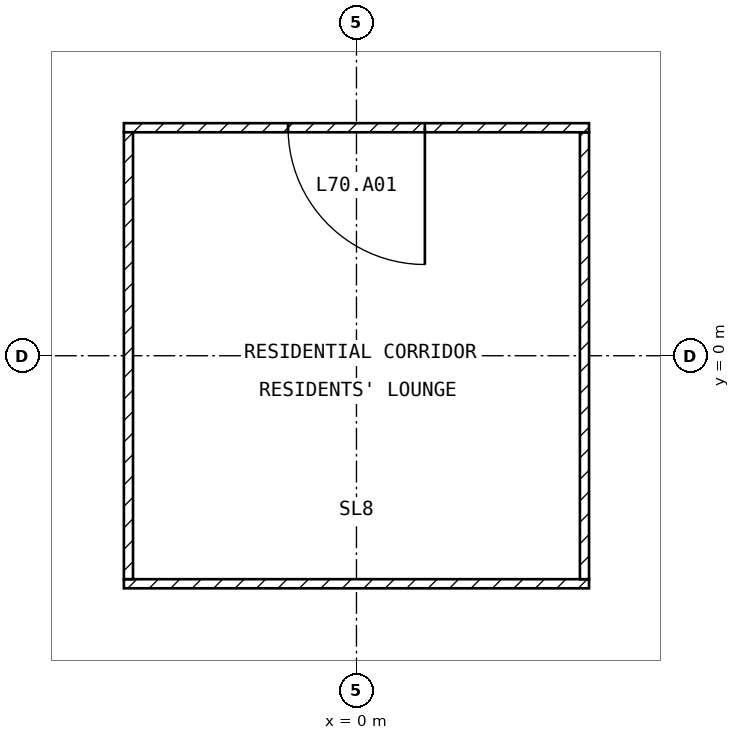
"""IFC4 building model, lengths in metres.
Left out: names, types, materials, properties, quantities, classifications, styles, units other than length and angle.
Written with IfcOpenShell. Run it as: python <this file> out.ifc"""

import sys

from ifc_helpers import new_model, si_unit, direction, frame, frame_2d, origin, place, context, subcontext, project, spatial, rectangle, extrude, element, fill, save


model = new_model("IFC4")
c1 = context("Model", 3, precision=1e-05, world=origin(), true_north=direction((0.0, 1.0)))
c2 = subcontext(c1, "Body", "Model", "MODEL_VIEW")
j1 = project(units=[si_unit("LENGTHUNIT", "METRE"), si_unit("PLANEANGLEUNIT", "RADIAN")], contexts=[c1])
p1 = place(None, origin())
s1 = spatial("IfcSite", under=j1, at=p1, CompositionType="ELEMENT")
p2 = place(p1, origin())
s2 = spatial("IfcBuilding", under=s1, at=p2, CompositionType="ELEMENT")
p3 = place(p2, frame((0.0, 0.0, 274.5)))
s3 = spatial("IfcBuildingStorey", under=s2, at=p3, CompositionType="ELEMENT", Elevation=274.5)
p4 = place(p3, frame((-3.06, -3.0, 0.0), z_axis=(0.0, 0.0, 1.0), x_axis=(1.0, 0.0, 0.0)))
e1 = element("IfcWall", 1, at=p4, inside=s3, PredefinedType="PARTITIONING", context=c2, shape_type="SweptSolid", body=[
    extrude(rectangle(XDim=6.12, YDim=0.12, at=frame_2d((3.06, 0.0))), origin(), (0.0, 0.0, 1.0), 3.25),
])
p5 = place(p3, frame((3.0, -2.94, 0.0), z_axis=(0.0, 0.0, 1.0), x_axis=(0.0, 1.0, 0.0)))
e2 = element("IfcWall", 2, at=p5, inside=s3, PredefinedType="PARTITIONING", context=c2, shape_type="SweptSolid", body=[
    extrude(rectangle(XDim=5.88, YDim=0.12, at=frame_2d((2.94, 0.0))), origin(), (0.0, 0.0, 1.0), 3.25),
])
p6 = place(p3, frame((3.06, 3.0, 0.0), z_axis=(0.0, 0.0, 1.0), x_axis=(-1.0, 0.0, 0.0)))
e3 = element("IfcWall", 3, at=p6, inside=s3, PredefinedType="PARTITIONING", context=c2, shape_type="SweptSolid", body=[
    extrude(rectangle(XDim=6.12, YDim=0.12, at=frame_2d((3.06, 0.0))), origin(), (0.0, 0.0, 1.0), 3.25),
])
p7 = place(p6, frame((2.16, 0.0, 0.0)))
e4 = element("IfcOpeningElement", 4, at=p7, cuts=e3, PredefinedType="OPENING", context=c2, shape_type="SweptSolid", body=[
    extrude(rectangle(XDim=1.8, YDim=2.1, at=frame_2d((0.9, 1.05))), frame((0.0, 0.07, 0.0), z_axis=(0.0, -1.0, 0.0), x_axis=(1.0, 0.0, 0.0)), (0.0, 0.0, 1.0), 0.14),
])
p8 = place(p3, frame((-3.0, 2.94, 0.0), z_axis=(0.0, 0.0, 1.0), x_axis=(0.0, -1.0, 0.0)))
e5 = element("IfcWall", 5, at=p8, inside=s3, PredefinedType="PARTITIONING", context=c2, shape_type="SweptSolid", body=[
    extrude(rectangle(XDim=5.88, YDim=0.12, at=frame_2d((2.94, 0.0))), origin(), (0.0, 0.0, 1.0), 3.25),
])
p9 = place(p7, origin())
e6 = element("IfcDoor", 6, at=p9, inside=s3, OperationType="SINGLE_SWING_LEFT", PredefinedType="DOOR", context=c2, shape_type="SweptSolid", body=[
    extrude(rectangle(XDim=1.8, YDim=2.1, at=frame_2d((0.9, 1.05))), frame((0.0, 0.025, 0.0), z_axis=(0.0, -1.0, 0.0), x_axis=(1.0, 0.0, 0.0)), (0.0, 0.0, 1.0), 0.05),
])
fill(e4, e6)
save(model, sys.argv[1])
